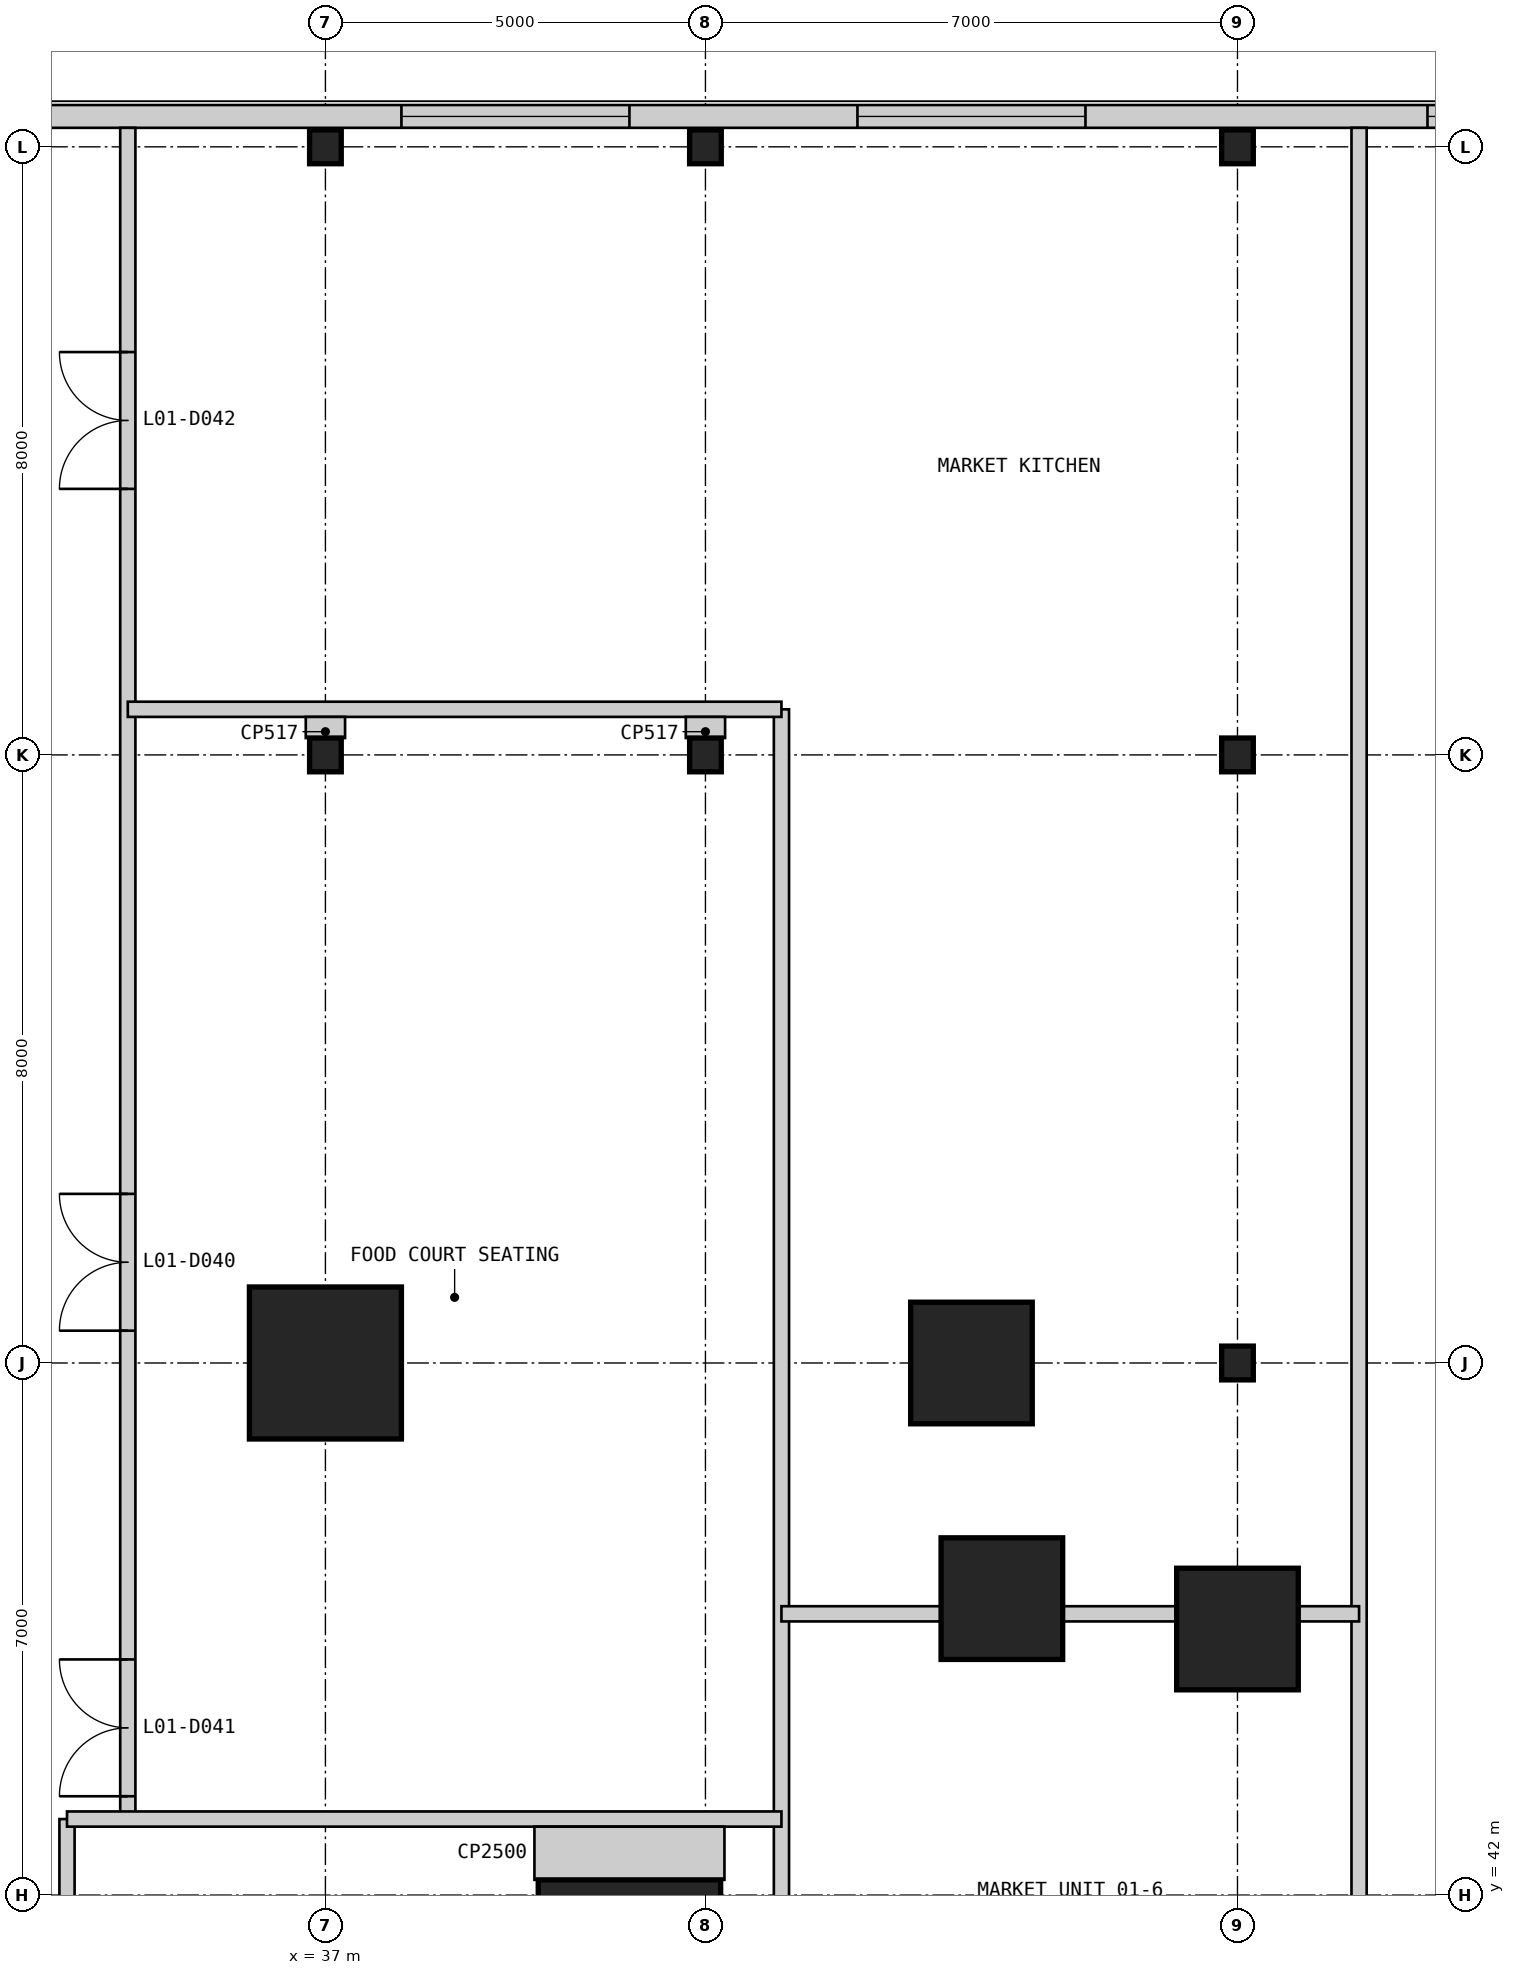
"""IFC4 building model, lengths in metres.
Left out: names, types, materials, properties, quantities, classifications, styles, units other than length and angle.
Written with IfcOpenShell. Run it as: python <this file> out.ifc"""

import sys

from ifc_helpers import new_model, si_unit, direction, frame, frame_2d, origin, origin_2d, place, context, subcontext, project, spatial, rectangle, i_section, extrude, element, fill, save


model = new_model("IFC4")
c1 = context("Model", 3, precision=1e-05, world=origin(), true_north=direction((0.0, 1.0)))
c2 = subcontext(c1, "Body", "Model", "MODEL_VIEW")
j1 = project(units=[si_unit("LENGTHUNIT", "METRE"), si_unit("PLANEANGLEUNIT", "RADIAN")], contexts=[c1])
p1 = place(None, origin())
s1 = spatial("IfcSite", under=j1, at=p1, CompositionType="ELEMENT")
p2 = place(p1, origin())
s2 = spatial("IfcBuilding", under=s1, at=p2, CompositionType="ELEMENT")
p3 = place(p2, frame((0.0, 0.0, 7.0)))
s3 = spatial("IfcBuildingStorey", under=s2, at=p3, CompositionType="ELEMENT", Elevation=7.0)
p4 = place(p3, frame((41.0, 41.0, 0.0), z_axis=(0.0, 0.0, 1.0), x_axis=(1.0, 0.0, 0.0)))
e1 = element("IfcColumn", 1, at=p4, inside=s3, PredefinedType="COLUMN", context=c2, shape_type="SweptSolid", body=[
    extrude(rectangle(XDim=2.4, YDim=2.4, at=origin_2d()), origin(), (0.0, 0.0, 1.0), 4.8),
])
for number, where, z_axis, x_axis in (
    (2, (49.0, 45.5, 0.0), (0.0, 0.0, 1.0), (1.0, 0.0, 0.0)),
    (3, (45.9, 45.9, 0.0), (0.0, 0.0, 1.0), (1.0, 0.0, 0.0)),
    (4, (45.5, 49.0, 0.0), (0.0, 0.0, 1.0), (1.0, 0.0, 0.0)),
):
    element("IfcColumn", number, at=place(p3, frame(where, z_axis=z_axis, x_axis=x_axis)), inside=s3, PredefinedType="COLUMN", context=c2, shape_type="SweptSolid", body=[
        extrude(rectangle(XDim=1.6, YDim=1.6, at=origin_2d()), origin(), (0.0, 0.0, 1.0), 4.8),
    ])
p5 = place(p3, frame((37.0, 49.0, 0.0), z_axis=(0.0, 0.0, 1.0), x_axis=(1.0, 0.0, 0.0)))
e5 = element("IfcColumn", 5, at=p5, inside=s3, PredefinedType="COLUMN", context=c2, shape_type="SweptSolid", body=[
    extrude(rectangle(XDim=2.0, YDim=2.0, at=origin_2d()), origin(), (0.0, 0.0, 1.0), 4.8),
])
for number, where, z_axis, x_axis in (
    (6, (37.0, 57.0, 0.0), (0.0, 0.0, 1.0), (1.0, 0.0, 0.0)),
    (7, (37.0, 65.0, 0.0), (0.0, 0.0, 1.0), (1.0, 0.0, 0.0)),
    (8, (42.0, 57.0, 0.0), (0.0, 0.0, 1.0), (1.0, 0.0, 0.0)),
    (9, (42.0, 65.0, 0.0), (0.0, 0.0, 1.0), (1.0, 0.0, 0.0)),
    (10, (49.0, 49.0, 0.0), (0.0, 0.0, 1.0), (1.0, 0.0, 0.0)),
    (11, (49.0, 57.0, 0.0), (0.0, 0.0, 1.0), (1.0, 0.0, 0.0)),
    (12, (49.0, 65.0, 0.0), (0.0, 0.0, 1.0), (1.0, 0.0, 0.0)),
):
    element("IfcColumn", number, at=place(p3, frame(where, z_axis=z_axis, x_axis=x_axis)), inside=s3, PredefinedType="COLUMN", context=c2, shape_type="SweptSolid", body=[
        extrude(i_section(OverallWidth=0.417, OverallDepth=0.445, WebThickness=0.039, FlangeThickness=0.063, at=origin_2d()), origin(), (0.0, 0.0, 1.0), 4.8),
    ])
p6 = place(p3, frame((65.55, 65.4, 0.0), z_axis=(0.0, 0.0, 1.0), x_axis=(-1.0, 0.0, 0.0)))
e13 = element("IfcWall", 13, at=p6, inside=s3, PredefinedType="SOLIDWALL", context=c2, shape_type="SweptSolid", body=[
    extrude(rectangle(XDim=81.1, YDim=0.3, at=frame_2d((40.55, 0.0))), origin(), (0.0, 0.0, 1.0), 4.5),
])
p7 = place(p6, frame((75.05, 0.0, 0.9)))
e14 = element("IfcOpeningElement", 14, at=p7, cuts=e13, PredefinedType="OPENING", context=c2, shape_type="SweptSolid", body=[
    extrude(rectangle(XDim=3.0, YDim=2.4, at=frame_2d((1.5, 1.2))), frame((0.0, 0.16, 0.0), z_axis=(0.0, -1.0, 0.0), x_axis=(1.0, 0.0, 0.0)), (0.0, 0.0, 1.0), 0.32),
])
p8 = place(p6, frame((67.05, 0.0, 0.9)))
e15 = element("IfcOpeningElement", 15, at=p8, cuts=e13, PredefinedType="OPENING", context=c2, shape_type="SweptSolid", body=[
    extrude(rectangle(XDim=3.0, YDim=2.4, at=frame_2d((1.5, 1.2))), frame((0.0, 0.16, 0.0), z_axis=(0.0, -1.0, 0.0), x_axis=(1.0, 0.0, 0.0)), (0.0, 0.0, 1.0), 0.32),
])
p9 = place(p6, frame((59.05, 0.0, 0.9)))
e16 = element("IfcOpeningElement", 16, at=p9, cuts=e13, PredefinedType="OPENING", context=c2, shape_type="SweptSolid", body=[
    extrude(rectangle(XDim=3.0, YDim=2.4, at=frame_2d((1.5, 1.2))), frame((0.0, 0.16, 0.0), z_axis=(0.0, -1.0, 0.0), x_axis=(1.0, 0.0, 0.0)), (0.0, 0.0, 1.0), 0.32),
])
p10 = place(p6, frame((45.05, 0.0, 0.9)))
e17 = element("IfcOpeningElement", 17, at=p10, cuts=e13, PredefinedType="OPENING", context=c2, shape_type="SweptSolid", body=[
    extrude(rectangle(XDim=3.0, YDim=2.4, at=frame_2d((1.5, 1.2))), frame((0.0, 0.16, 0.0), z_axis=(0.0, -1.0, 0.0), x_axis=(1.0, 0.0, 0.0)), (0.0, 0.0, 1.0), 0.32),
])
p11 = place(p6, frame((33.05, 0.0, 0.9)))
e18 = element("IfcOpeningElement", 18, at=p11, cuts=e13, PredefinedType="OPENING", context=c2, shape_type="SweptSolid", body=[
    extrude(rectangle(XDim=3.0, YDim=2.4, at=frame_2d((1.5, 1.2))), frame((0.0, 0.16, 0.0), z_axis=(0.0, -1.0, 0.0), x_axis=(1.0, 0.0, 0.0)), (0.0, 0.0, 1.0), 0.32),
])
p12 = place(p6, frame((24.55, 0.0, 0.9)))
e19 = element("IfcOpeningElement", 19, at=p12, cuts=e13, PredefinedType="OPENING", context=c2, shape_type="SweptSolid", body=[
    extrude(rectangle(XDim=3.0, YDim=2.4, at=frame_2d((1.5, 1.2))), frame((0.0, 0.16, 0.0), z_axis=(0.0, -1.0, 0.0), x_axis=(1.0, 0.0, 0.0)), (0.0, 0.0, 1.0), 0.32),
])
p13 = place(p6, frame((18.55, 0.0, 0.9)))
e20 = element("IfcOpeningElement", 20, at=p13, cuts=e13, PredefinedType="OPENING", context=c2, shape_type="SweptSolid", body=[
    extrude(rectangle(XDim=3.0, YDim=2.4, at=frame_2d((1.5, 1.2))), frame((0.0, 0.16, 0.0), z_axis=(0.0, -1.0, 0.0), x_axis=(1.0, 0.0, 0.0)), (0.0, 0.0, 1.0), 0.32),
])
p14 = place(p6, frame((11.05, 0.0, 0.9)))
e21 = element("IfcOpeningElement", 21, at=p14, cuts=e13, PredefinedType="OPENING", context=c2, shape_type="SweptSolid", body=[
    extrude(rectangle(XDim=3.0, YDim=2.4, at=frame_2d((1.5, 1.2))), frame((0.0, 0.16, 0.0), z_axis=(0.0, -1.0, 0.0), x_axis=(1.0, 0.0, 0.0)), (0.0, 0.0, 1.0), 0.32),
])
p15 = place(p6, frame((3.05, 0.0, 0.9)))
e22 = element("IfcOpeningElement", 22, at=p15, cuts=e13, PredefinedType="OPENING", context=c2, shape_type="SweptSolid", body=[
    extrude(rectangle(XDim=3.0, YDim=2.4, at=frame_2d((1.5, 1.2))), frame((0.0, 0.16, 0.0), z_axis=(0.0, -1.0, 0.0), x_axis=(1.0, 0.0, 0.0)), (0.0, 0.0, 1.0), 0.32),
])
p16 = place(p3, frame((33.6, 37.0, 0.0), z_axis=(0.0, 0.0, 1.0), x_axis=(0.0, 1.0, 0.0)))
e23 = element("IfcWall", 23, at=p16, inside=s3, PredefinedType="PARTITIONING", context=c2, shape_type="SweptSolid", body=[
    extrude(rectangle(XDim=6.0, YDim=0.2, at=frame_2d((3.0, 0.0))), origin(), (0.0, 0.0, 1.0), 4.5),
])
p17 = place(p16, frame((2.55, 0.0, 0.0)))
e24 = element("IfcOpeningElement", 24, at=p17, cuts=e23, PredefinedType="OPENING", context=c2, shape_type="SweptSolid", body=[
    extrude(rectangle(XDim=0.9, YDim=2.2, at=frame_2d((0.45, 1.1))), frame((0.0, 0.11, 0.0), z_axis=(0.0, -1.0, 0.0), x_axis=(1.0, 0.0, 0.0)), (0.0, 0.0, 1.0), 0.22),
])
p18 = place(p3, frame((34.4, 43.0, 0.0), z_axis=(0.0, 0.0, 1.0), x_axis=(0.0, 1.0, 0.0)))
e25 = element("IfcWall", 25, at=p18, inside=s3, PredefinedType="PARTITIONING", context=c2, shape_type="SweptSolid", body=[
    extrude(rectangle(XDim=22.25, YDim=0.2, at=frame_2d((11.125, 0.0))), origin(), (0.0, 0.0, 1.0), 4.5),
])
p19 = place(p18, frame((6.425, 0.0, 0.0)))
e26 = element("IfcOpeningElement", 26, at=p19, cuts=e25, PredefinedType="OPENING", context=c2, shape_type="SweptSolid", body=[
    extrude(rectangle(XDim=1.8, YDim=2.4, at=frame_2d((0.9, 1.2))), frame((0.0, 0.11, 0.0), z_axis=(0.0, -1.0, 0.0), x_axis=(1.0, 0.0, 0.0)), (0.0, 0.0, 1.0), 0.22),
])
p20 = place(p18, frame((0.3, 0.0, 0.0)))
e27 = element("IfcOpeningElement", 27, at=p20, cuts=e25, PredefinedType="OPENING", context=c2, shape_type="SweptSolid", body=[
    extrude(rectangle(XDim=1.8, YDim=2.4, at=frame_2d((0.9, 1.2))), frame((0.0, 0.11, 0.0), z_axis=(0.0, -1.0, 0.0), x_axis=(1.0, 0.0, 0.0)), (0.0, 0.0, 1.0), 0.22),
])
p21 = place(p18, frame((17.5, 0.0, 0.0)))
e28 = element("IfcOpeningElement", 28, at=p21, cuts=e25, PredefinedType="OPENING", context=c2, shape_type="SweptSolid", body=[
    extrude(rectangle(XDim=1.8, YDim=2.4, at=frame_2d((0.9, 1.2))), frame((0.0, 0.11, 0.0), z_axis=(0.0, -1.0, 0.0), x_axis=(1.0, 0.0, 0.0)), (0.0, 0.0, 1.0), 0.22),
])
p22 = place(p3, frame((43.0, 37.0, 0.0), z_axis=(0.0, 0.0, 1.0), x_axis=(0.0, 1.0, 0.0)))
e29 = element("IfcWall", 29, at=p22, inside=s3, PredefinedType="PARTITIONING", context=c2, shape_type="SweptSolid", body=[
    extrude(rectangle(XDim=20.6, YDim=0.2, at=frame_2d((10.3, 0.0))), origin(), (0.0, 0.0, 1.0), 4.5),
])
p23 = place(p3, frame((50.6, 38.4, 0.0), z_axis=(0.0, 0.0, 1.0), x_axis=(0.0, 1.0, 0.0)))
e30 = element("IfcWall", 30, at=p23, inside=s3, PredefinedType="PARTITIONING", context=c2, shape_type="SweptSolid", body=[
    extrude(rectangle(XDim=26.85, YDim=0.2, at=frame_2d((13.425, 0.0))), origin(), (0.0, 0.0, 1.0), 4.5),
])
p24 = place(p3, frame((33.6, 43.0, 0.0), z_axis=(0.0, 0.0, 1.0), x_axis=(1.0, 0.0, 0.0)))
e31 = element("IfcWall", 31, at=p24, inside=s3, PredefinedType="PARTITIONING", context=c2, shape_type="SweptSolid", body=[
    extrude(rectangle(XDim=9.4, YDim=0.2, at=frame_2d((4.7, 0.0))), origin(), (0.0, 0.0, 1.0), 4.5),
])
p25 = place(p3, frame((43.0, 45.7, 0.0), z_axis=(0.0, 0.0, 1.0), x_axis=(1.0, 0.0, 0.0)))
e32 = element("IfcWall", 32, at=p25, inside=s3, PredefinedType="PARTITIONING", context=c2, shape_type="SweptSolid", body=[
    extrude(rectangle(XDim=2.1, YDim=0.2, at=frame_2d((1.05, 0.0))), origin(), (0.0, 0.0, 1.0), 4.5),
])
p26 = place(p3, frame((46.7, 45.7, 0.0), z_axis=(0.0, 0.0, 1.0), x_axis=(1.0, 0.0, 0.0)))
e33 = element("IfcWall", 33, at=p26, inside=s3, PredefinedType="PARTITIONING", context=c2, shape_type="SweptSolid", body=[
    extrude(rectangle(XDim=1.5, YDim=0.2, at=frame_2d((0.75, 0.0))), origin(), (0.0, 0.0, 1.0), 3.65),
])
p27 = place(p3, frame((49.8, 45.7, 0.0), z_axis=(0.0, 0.0, 1.0), x_axis=(1.0, 0.0, 0.0)))
e34 = element("IfcWall", 34, at=p27, inside=s3, PredefinedType="PARTITIONING", context=c2, shape_type="SweptSolid", body=[
    extrude(rectangle(XDim=0.8, YDim=0.2, at=frame_2d((0.4, 0.0))), origin(), (0.0, 0.0, 1.0), 4.5),
])
p28 = place(p3, frame((34.4, 57.6, 0.0), z_axis=(0.0, 0.0, 1.0), x_axis=(1.0, 0.0, 0.0)))
e35 = element("IfcWall", 35, at=p28, inside=s3, PredefinedType="PARTITIONING", context=c2, shape_type="SweptSolid", body=[
    extrude(rectangle(XDim=8.6, YDim=0.2, at=frame_2d((4.3, 0.0))), origin(), (0.0, 0.0, 1.0), 4.5),
])
for number, where, z_axis, x_axis in (
    (36, (37.0, 57.5, 0.0), (0.0, 0.0, 1.0), (0.0, -1.0, 0.0)),
    (37, (42.0, 57.5, 0.0), (0.0, 0.0, 1.0), (0.0, -1.0, 0.0)),
):
    element("IfcWall", number, at=place(p3, frame(where, z_axis=z_axis, x_axis=x_axis)), inside=s3, PredefinedType="PARTITIONING", context=c2, shape_type="SweptSolid", body=[
        extrude(rectangle(XDim=0.278, YDim=0.517, at=frame_2d((0.139, 0.0))), origin(), (0.0, 0.0, 1.0), 4.5),
    ])
p29 = place(p3, frame((41.0, 42.9, 0.0), z_axis=(0.0, 0.0, 1.0), x_axis=(0.0, -1.0, 0.0)))
e38 = element("IfcWall", 38, at=p29, inside=s3, PredefinedType="PARTITIONING", context=c2, shape_type="SweptSolid", body=[
    extrude(rectangle(XDim=0.7, YDim=2.5, at=frame_2d((0.35, 0.0))), origin(), (0.0, 0.0, 1.0), 4.5),
])
p30 = place(p12, origin())
e39 = element("IfcWindow", 39, at=p30, inside=s3, PartitioningType="SINGLE_PANEL", PredefinedType="WINDOW", context=c2, shape_type="SweptSolid", body=[
    extrude(rectangle(XDim=3.0, YDim=2.4, at=frame_2d((1.5, 1.2))), frame((0.0, 0.03, 0.0), z_axis=(0.0, -1.0, 0.0), x_axis=(1.0, 0.0, 0.0)), (0.0, 0.0, 1.0), 0.06),
])
fill(e19, e39)
p31 = place(p13, origin())
e40 = element("IfcWindow", 40, at=p31, inside=s3, PartitioningType="SINGLE_PANEL", PredefinedType="WINDOW", context=c2, shape_type="SweptSolid", body=[
    extrude(rectangle(XDim=3.0, YDim=2.4, at=frame_2d((1.5, 1.2))), frame((0.0, 0.03, 0.0), z_axis=(0.0, -1.0, 0.0), x_axis=(1.0, 0.0, 0.0)), (0.0, 0.0, 1.0), 0.06),
])
fill(e20, e40)
p32 = place(p14, origin())
e41 = element("IfcWindow", 41, at=p32, inside=s3, PartitioningType="SINGLE_PANEL", PredefinedType="WINDOW", context=c2, shape_type="SweptSolid", body=[
    extrude(rectangle(XDim=3.0, YDim=2.4, at=frame_2d((1.5, 1.2))), frame((0.0, 0.03, 0.0), z_axis=(0.0, -1.0, 0.0), x_axis=(1.0, 0.0, 0.0)), (0.0, 0.0, 1.0), 0.06),
])
fill(e21, e41)
p33 = place(p19, origin())
e42 = element("IfcDoor", 42, at=p33, inside=s3, OperationType="DOUBLE_DOOR_SINGLE_SWING", PredefinedType="DOOR", context=c2, shape_type="SweptSolid", body=[
    extrude(rectangle(XDim=1.8, YDim=2.4, at=frame_2d((0.9, 1.2))), frame((0.0, 0.025, 0.0), z_axis=(0.0, -1.0, 0.0), x_axis=(1.0, 0.0, 0.0)), (0.0, 0.0, 1.0), 0.05),
])
fill(e26, e42)
p34 = place(p20, origin())
e43 = element("IfcDoor", 43, at=p34, inside=s3, OperationType="DOUBLE_DOOR_SINGLE_SWING", PredefinedType="DOOR", context=c2, shape_type="SweptSolid", body=[
    extrude(rectangle(XDim=1.8, YDim=2.4, at=frame_2d((0.9, 1.2))), frame((0.0, 0.025, 0.0), z_axis=(0.0, -1.0, 0.0), x_axis=(1.0, 0.0, 0.0)), (0.0, 0.0, 1.0), 0.05),
])
fill(e27, e43)
p35 = place(p21, origin())
e44 = element("IfcDoor", 44, at=p35, inside=s3, OperationType="DOUBLE_DOOR_SINGLE_SWING", PredefinedType="DOOR", context=c2, shape_type="SweptSolid", body=[
    extrude(rectangle(XDim=1.8, YDim=2.4, at=frame_2d((0.9, 1.2))), frame((0.0, 0.025, 0.0), z_axis=(0.0, -1.0, 0.0), x_axis=(1.0, 0.0, 0.0)), (0.0, 0.0, 1.0), 0.05),
])
fill(e28, e44)
save(model, sys.argv[1])
